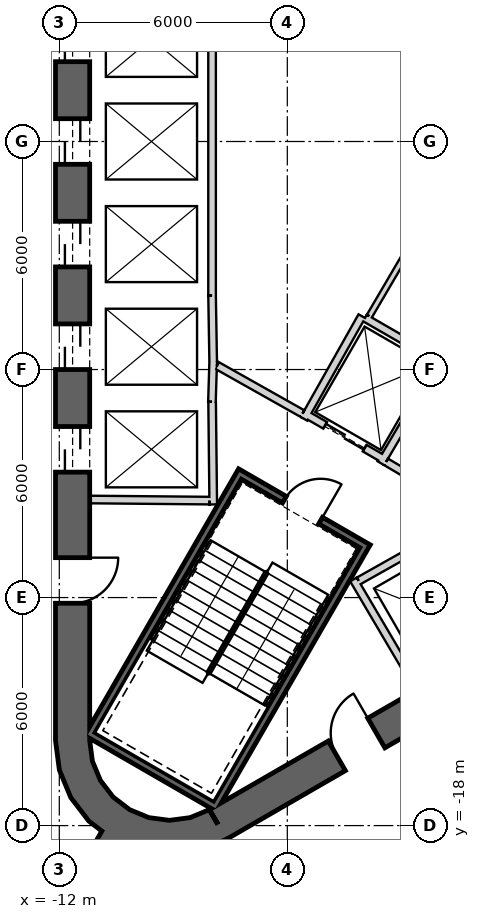
"""IFC4 building model, lengths in metres.
Left out: names, types, materials, properties, quantities, classifications, styles, units other than length and angle.
Written with IfcOpenShell. Run it as: python <this file> out.ifc"""

import sys

from ifc_helpers import new_model, si_unit, direction, frame, frame_2d, origin, place, context, subcontext, project, spatial, polyline, rectangle, outline, extrude, element, fill, save


model = new_model("IFC4")
c1 = context("Model", 3, precision=1e-05, world=origin(), true_north=direction((0.0, 1.0)))
c2 = subcontext(c1, "Body", "Model", "MODEL_VIEW")
j1 = project(units=[si_unit("LENGTHUNIT", "METRE"), si_unit("PLANEANGLEUNIT", "RADIAN")], contexts=[c1])
p1 = place(None, origin())
s1 = spatial("IfcSite", under=j1, at=p1, CompositionType="ELEMENT")
p2 = place(p1, origin())
s2 = spatial("IfcBuilding", under=s1, at=p2, CompositionType="ELEMENT")
p3 = place(p2, frame((0.0, 0.0, 205.2)))
s3 = spatial("IfcBuildingStorey", under=s2, at=p3, CompositionType="ELEMENT", Elevation=205.2)
p4 = place(p3, frame((19.475, 2.208, 0.0), z_axis=(0.0, 0.0, 1.0), x_axis=(-0.866028369851, 0.499994862586, 0.0)))
e1 = element("IfcWall", 1, at=p4, inside=s3, PredefinedType="SHEAR", context=c2, shape_type="SweptSolid", body=[
    extrude(rectangle(XDim=31.523, YDim=0.9, at=frame_2d((15.762, 0.0))), origin(), (0.0, 0.0, 1.0), 4.0),
])
p5 = place(p4, frame((7.062, 0.0, 0.0)))
e2 = element("IfcOpeningElement", 2, at=p5, cuts=e1, PredefinedType="OPENING", context=c2, shape_type="SweptSolid", body=[
    extrude(rectangle(XDim=1.2, YDim=2.4, at=frame_2d((0.6, 1.2))), frame((0.0, 0.46, 0.0), z_axis=(0.0, -1.0, 0.0), x_axis=(1.0, 0.0, 0.0)), (0.0, 0.0, 1.0), 0.92),
])
p6 = place(p4, frame((3.612, 0.0, 0.0)))
e3 = element("IfcOpeningElement", 3, at=p6, cuts=e1, PredefinedType="OPENING", context=c2, shape_type="SweptSolid", body=[
    extrude(rectangle(XDim=1.2, YDim=2.4, at=frame_2d((0.6, 1.2))), frame((0.0, 0.46, 0.0), z_axis=(0.0, -1.0, 0.0), x_axis=(1.0, 0.0, 0.0)), (0.0, 0.0, 1.0), 0.92),
])
p7 = place(p4, frame((26.712, 0.0, 0.0)))
e4 = element("IfcOpeningElement", 4, at=p7, cuts=e1, PredefinedType="OPENING", context=c2, shape_type="SweptSolid", body=[
    extrude(rectangle(XDim=1.2, YDim=2.4, at=frame_2d((0.6, 1.2))), frame((0.0, 0.46, 0.0), z_axis=(0.0, -1.0, 0.0), x_axis=(1.0, 0.0, 0.0)), (0.0, 0.0, 1.0), 0.92),
])
p8 = place(p3, frame((-11.65, 15.762, 0.0), z_axis=(0.0, 0.0, 1.0), x_axis=(0.0, -1.0, 0.0)))
e5 = element("IfcWall", 5, at=p8, inside=s3, PredefinedType="SHEAR", context=c2, shape_type="SweptSolid", body=[
    extrude(rectangle(XDim=31.523, YDim=0.9, at=frame_2d((15.762, 0.0))), origin(), (0.0, 0.0, 1.0), 4.0),
])
p9 = place(p8, frame((7.062, 0.0, 0.0)))
e6 = element("IfcOpeningElement", 6, at=p9, cuts=e5, PredefinedType="OPENING", context=c2, shape_type="SweptSolid", body=[
    extrude(rectangle(XDim=1.2, YDim=2.4, at=frame_2d((0.6, 1.2))), frame((0.0, 0.46, 0.0), z_axis=(0.0, -1.0, 0.0), x_axis=(1.0, 0.0, 0.0)), (0.0, 0.0, 1.0), 0.92),
])
p10 = place(p8, frame((9.762, 0.0, 0.0)))
e7 = element("IfcOpeningElement", 7, at=p10, cuts=e5, PredefinedType="OPENING", context=c2, shape_type="SweptSolid", body=[
    extrude(rectangle(XDim=1.2, YDim=2.4, at=frame_2d((0.6, 1.2))), frame((0.0, 0.46, 0.0), z_axis=(0.0, -1.0, 0.0), x_axis=(1.0, 0.0, 0.0)), (0.0, 0.0, 1.0), 0.92),
])
p11 = place(p8, frame((12.462, 0.0, 0.0)))
e8 = element("IfcOpeningElement", 8, at=p11, cuts=e5, PredefinedType="OPENING", context=c2, shape_type="SweptSolid", body=[
    extrude(rectangle(XDim=1.2, YDim=2.4, at=frame_2d((0.6, 1.2))), frame((0.0, 0.46, 0.0), z_axis=(0.0, -1.0, 0.0), x_axis=(1.0, 0.0, 0.0)), (0.0, 0.0, 1.0), 0.92),
])
p12 = place(p8, frame((15.162, 0.0, 0.0)))
e9 = element("IfcOpeningElement", 9, at=p12, cuts=e5, PredefinedType="OPENING", context=c2, shape_type="SweptSolid", body=[
    extrude(rectangle(XDim=1.2, YDim=2.4, at=frame_2d((0.6, 1.2))), frame((0.0, 0.46, 0.0), z_axis=(0.0, -1.0, 0.0), x_axis=(1.0, 0.0, 0.0)), (0.0, 0.0, 1.0), 0.92),
])
p13 = place(p8, frame((17.862, 0.0, 0.0)))
e10 = element("IfcOpeningElement", 10, at=p13, cuts=e5, PredefinedType="OPENING", context=c2, shape_type="SweptSolid", body=[
    extrude(rectangle(XDim=1.2, YDim=2.4, at=frame_2d((0.6, 1.2))), frame((0.0, 0.46, 0.0), z_axis=(0.0, -1.0, 0.0), x_axis=(1.0, 0.0, 0.0)), (0.0, 0.0, 1.0), 0.92),
])
p14 = place(p8, frame((20.562, 0.0, 0.0)))
e11 = element("IfcOpeningElement", 11, at=p14, cuts=e5, PredefinedType="OPENING", context=c2, shape_type="SweptSolid", body=[
    extrude(rectangle(XDim=1.2, YDim=2.4, at=frame_2d((0.6, 1.2))), frame((0.0, 0.46, 0.0), z_axis=(0.0, -1.0, 0.0), x_axis=(1.0, 0.0, 0.0)), (0.0, 0.0, 1.0), 0.92),
])
p15 = place(p8, frame((23.262, 0.0, 0.0)))
e12 = element("IfcOpeningElement", 12, at=p15, cuts=e5, PredefinedType="OPENING", context=c2, shape_type="SweptSolid", body=[
    extrude(rectangle(XDim=1.2, YDim=2.4, at=frame_2d((0.6, 1.2))), frame((0.0, 0.46, 0.0), z_axis=(0.0, -1.0, 0.0), x_axis=(1.0, 0.0, 0.0)), (0.0, 0.0, 1.0), 0.92),
])
p16 = place(p8, frame((3.612, 0.0, 0.0)))
e13 = element("IfcOpeningElement", 13, at=p16, cuts=e5, PredefinedType="OPENING", context=c2, shape_type="SweptSolid", body=[
    extrude(rectangle(XDim=1.2, YDim=2.4, at=frame_2d((0.6, 1.2))), frame((0.0, 0.46, 0.0), z_axis=(0.0, -1.0, 0.0), x_axis=(1.0, 0.0, 0.0)), (0.0, 0.0, 1.0), 0.92),
])
p17 = place(p8, frame((26.712, 0.0, 0.0)))
e14 = element("IfcOpeningElement", 14, at=p17, cuts=e5, PredefinedType="OPENING", context=c2, shape_type="SweptSolid", body=[
    extrude(rectangle(XDim=1.2, YDim=2.4, at=frame_2d((0.6, 1.2))), frame((0.0, 0.46, 0.0), z_axis=(0.0, -1.0, 0.0), x_axis=(1.0, 0.0, 0.0)), (0.0, 0.0, 1.0), 0.92),
])
p18 = place(p3, frame((-7.825, -17.97, 0.0), z_axis=(0.0, 0.0, 1.0), x_axis=(0.866028369851, 0.499994862586, 0.0)))
e15 = element("IfcWall", 15, at=p18, inside=s3, PredefinedType="SHEAR", context=c2, shape_type="SweptSolid", body=[
    extrude(rectangle(XDim=31.523, YDim=0.9, at=frame_2d((15.762, 0.0))), origin(), (0.0, 0.0, 1.0), 4.0),
])
p19 = place(p18, frame((7.062, 0.0, 0.0)))
e16 = element("IfcOpeningElement", 16, at=p19, cuts=e15, PredefinedType="OPENING", context=c2, shape_type="SweptSolid", body=[
    extrude(rectangle(XDim=1.2, YDim=2.4, at=frame_2d((0.6, 1.2))), frame((0.0, 0.46, 0.0), z_axis=(0.0, -1.0, 0.0), x_axis=(1.0, 0.0, 0.0)), (0.0, 0.0, 1.0), 0.92),
])
p20 = place(p18, frame((9.762, 0.0, 0.0)))
e17 = element("IfcOpeningElement", 17, at=p20, cuts=e15, PredefinedType="OPENING", context=c2, shape_type="SweptSolid", body=[
    extrude(rectangle(XDim=1.2, YDim=2.4, at=frame_2d((0.6, 1.2))), frame((0.0, 0.46, 0.0), z_axis=(0.0, -1.0, 0.0), x_axis=(1.0, 0.0, 0.0)), (0.0, 0.0, 1.0), 0.92),
])
p21 = place(p18, frame((12.462, 0.0, 0.0)))
e18 = element("IfcOpeningElement", 18, at=p21, cuts=e15, PredefinedType="OPENING", context=c2, shape_type="SweptSolid", body=[
    extrude(rectangle(XDim=1.2, YDim=2.4, at=frame_2d((0.6, 1.2))), frame((0.0, 0.46, 0.0), z_axis=(0.0, -1.0, 0.0), x_axis=(1.0, 0.0, 0.0)), (0.0, 0.0, 1.0), 0.92),
])
p22 = place(p18, frame((15.162, 0.0, 0.0)))
e19 = element("IfcOpeningElement", 19, at=p22, cuts=e15, PredefinedType="OPENING", context=c2, shape_type="SweptSolid", body=[
    extrude(rectangle(XDim=1.2, YDim=2.4, at=frame_2d((0.6, 1.2))), frame((0.0, 0.46, 0.0), z_axis=(0.0, -1.0, 0.0), x_axis=(1.0, 0.0, 0.0)), (0.0, 0.0, 1.0), 0.92),
])
p23 = place(p18, frame((17.862, 0.0, 0.0)))
e20 = element("IfcOpeningElement", 20, at=p23, cuts=e15, PredefinedType="OPENING", context=c2, shape_type="SweptSolid", body=[
    extrude(rectangle(XDim=1.2, YDim=2.4, at=frame_2d((0.6, 1.2))), frame((0.0, 0.46, 0.0), z_axis=(0.0, -1.0, 0.0), x_axis=(1.0, 0.0, 0.0)), (0.0, 0.0, 1.0), 0.92),
])
p24 = place(p18, frame((20.562, 0.0, 0.0)))
e21 = element("IfcOpeningElement", 21, at=p24, cuts=e15, PredefinedType="OPENING", context=c2, shape_type="SweptSolid", body=[
    extrude(rectangle(XDim=1.2, YDim=2.4, at=frame_2d((0.6, 1.2))), frame((0.0, 0.46, 0.0), z_axis=(0.0, -1.0, 0.0), x_axis=(1.0, 0.0, 0.0)), (0.0, 0.0, 1.0), 0.92),
])
p25 = place(p18, frame((26.712, 0.0, 0.0)))
e22 = element("IfcOpeningElement", 22, at=p25, cuts=e15, PredefinedType="OPENING", context=c2, shape_type="SweptSolid", body=[
    extrude(rectangle(XDim=1.2, YDim=2.4, at=frame_2d((0.6, 1.2))), frame((0.0, 0.46, 0.0), z_axis=(0.0, -1.0, 0.0), x_axis=(1.0, 0.0, 0.0)), (0.0, 0.0, 1.0), 0.92),
])
p26 = place(p18, frame((3.612, 0.0, 0.0)))
e23 = element("IfcOpeningElement", 23, at=p26, cuts=e15, PredefinedType="OPENING", context=c2, shape_type="SweptSolid", body=[
    extrude(rectangle(XDim=1.2, YDim=2.4, at=frame_2d((0.6, 1.2))), frame((0.0, 0.46, 0.0), z_axis=(0.0, -1.0, 0.0), x_axis=(1.0, 0.0, 0.0)), (0.0, 0.0, 1.0), 0.92),
])
p27 = place(p3, origin())
e24 = element("IfcWall", 24, at=p27, inside=s3, PredefinedType="SHEAR", context=c2, shape_type="SweptSolid", body=[
    extrude(outline(polyline([(-12.1, -15.762), (-11.998, -16.538), (-11.698, -17.262), (-11.221, -17.883), (-10.6, -18.36), (-9.876, -18.659), (-9.1, -18.762), (-8.323, -18.659), (-7.6, -18.36), (-8.05, -17.58), (-8.556, -17.79), (-9.1, -17.862), (-9.644, -17.79), (-10.15, -17.58), (-10.585, -17.247), (-10.919, -16.812), (-11.128, -16.305), (-11.2, -15.762), (-12.1, -15.762)])), origin(), (0.0, 0.0, 1.0), 4.0),
])
p28 = place(p3, frame((-10.575, -18.316, 0.0), z_axis=(0.0, 0.0, 1.0), x_axis=(-0.499999598486, -0.866025635599, 0.0)))
e25 = element("IfcWall", 25, at=p28, inside=s3, PredefinedType="SHEAR", context=c2, shape_type="SweptSolid", body=[
    extrude(rectangle(XDim=11.794, YDim=0.7, at=frame_2d((5.897, 0.0))), origin(), (0.0, 0.0, 1.0), 4.0),
])
p29 = place(p3, frame((-7.98, 4.05, 0.0), z_axis=(0.0, 0.0, 1.0), x_axis=(0.0, -1.0, 0.0)))
e26 = element("IfcWall", 26, at=p29, inside=s3, PredefinedType="PLUMBINGWALL", context=c2, shape_type="SweptSolid", body=[
    extrude(rectangle(XDim=8.1, YDim=0.2, at=frame_2d((4.05, 0.0))), origin(), (0.0, 0.0, 1.0), 3.7),
])
p30 = place(p3, frame((-7.95, -5.772, 0.0), z_axis=(0.0, 0.0, 1.0), x_axis=(-0.030803413295, -0.999525462272, 0.0)))
e27 = element("IfcWall", 27, at=p30, inside=s3, PredefinedType="PLUMBINGWALL", context=c2, shape_type="SweptSolid", body=[
    extrude(rectangle(XDim=1.078, YDim=0.2, at=frame_2d((0.539, 0.0))), origin(), (0.0, 0.0, 1.0), 3.7),
])
p31 = place(p3, frame((-7.98, -4.05, 0.0), z_axis=(0.0, 0.0, 1.0), x_axis=(0.016809909365, -0.999858703491, 0.0)))
e28 = element("IfcWall", 28, at=p31, inside=s3, PredefinedType="PLUMBINGWALL", context=c2, shape_type="SweptSolid", body=[
    extrude(rectangle(XDim=1.844, YDim=0.2, at=frame_2d((0.922, 0.0))), origin(), (0.0, 0.0, 1.0), 3.7),
])
p32 = place(p3, frame((-7.979, -6.85, 0.0), z_axis=(0.0, 0.0, 1.0), x_axis=(0.011121475088, -0.999938154483, 0.0)))
e29 = element("IfcWall", 29, at=p32, inside=s3, PredefinedType="PLUMBINGWALL", context=c2, shape_type="SweptSolid", body=[
    extrude(rectangle(XDim=2.7, YDim=0.2, at=frame_2d((1.35, 0.0))), origin(), (0.0, 0.0, 1.0), 3.7),
])
p33 = place(p3, frame((-8.05, -9.449, 0.0), z_axis=(0.0, 0.0, 1.0), x_axis=(-0.999957467379, 0.009222983926, 0.0)))
e30 = element("IfcWall", 30, at=p33, inside=s3, PredefinedType="PLUMBINGWALL", context=c2, shape_type="SweptSolid", body=[
    extrude(rectangle(XDim=3.15, YDim=0.2, at=frame_2d((1.575, 0.0))), origin(), (0.0, 0.0, 1.0), 3.7),
])
p34 = place(p3, frame((-2.558, -14.409, 0.0), z_axis=(0.0, 0.0, 1.0), x_axis=(-0.507997497166, 0.861358544901, 0.0)))
e31 = element("IfcWall", 31, at=p34, inside=s3, PredefinedType="PLUMBINGWALL", context=c2, shape_type="SweptSolid", body=[
    extrude(rectangle(XDim=3.35, YDim=0.2, at=frame_2d((1.675, 0.0))), origin(), (0.0, 0.0, 1.0), 3.7),
])
p35 = place(p3, frame((-1.769, -10.237, 0.0), z_axis=(0.0, 0.0, 1.0), x_axis=(-0.871534483978, -0.490334215854, 0.0)))
e32 = element("IfcWall", 32, at=p35, inside=s3, PredefinedType="PLUMBINGWALL", context=c2, shape_type="SweptSolid", body=[
    extrude(rectangle(XDim=2.7, YDim=0.2, at=frame_2d((1.35, 0.0))), origin(), (0.0, 0.0, 1.0), 3.7),
])
p36 = place(p3, frame((-3.905, -10.563, -0.3), z_axis=(0.0, 0.0, 1.0), x_axis=(-0.500012932018, -0.866017937352, 0.0)))
e33 = element("IfcWall", 33, at=p36, inside=s3, PredefinedType="SHEAR", context=c2, shape_type="SweptSolid", body=[
    extrude(rectangle(XDim=8.1, YDim=0.2, at=frame_2d((4.05, 0.0))), origin(), (0.0, 0.0, 1.0), 4.0),
])
p37 = place(p3, frame((-11.282, -15.541, -0.3), z_axis=(0.0, 0.0, 1.0), x_axis=(0.866000483506, -0.500043160704, 0.0)))
e34 = element("IfcWall", 34, at=p37, inside=s3, PredefinedType="SHEAR", context=c2, shape_type="SweptSolid", body=[
    extrude(rectangle(XDim=3.8, YDim=0.2, at=frame_2d((1.9, 0.0))), origin(), (0.0, 0.0, 1.0), 4.0),
])
p38 = place(p3, frame((-7.196, -8.663, -0.3), z_axis=(0.0, 0.0, 1.0), x_axis=(-0.499997992926, -0.866026562566, 0.0)))
e35 = element("IfcWall", 35, at=p38, inside=s3, PredefinedType="SHEAR", context=c2, shape_type="SweptSolid", body=[
    extrude(rectangle(XDim=7.9, YDim=0.2, at=frame_2d((3.95, 0.0))), origin(), (0.0, 0.0, 1.0), 4.0),
])
p39 = place(p3, frame((-4.041, -10.599, -0.3), z_axis=(0.0, 0.0, 1.0), x_axis=(-0.866047807691, 0.499961193289, 0.0)))
e36 = element("IfcWall", 36, at=p39, inside=s3, PredefinedType="SHEAR", context=c2, shape_type="SweptSolid", body=[
    extrude(rectangle(XDim=3.6, YDim=0.2, at=frame_2d((1.8, 0.0))), origin(), (0.0, 0.0, 1.0), 4.0),
])
p40 = place(p39, frame((1.25, 0.0, 0.3)))
e37 = element("IfcOpeningElement", 37, at=p40, cuts=e36, PredefinedType="OPENING", context=c2, shape_type="SweptSolid", body=[
    extrude(rectangle(XDim=1.1, YDim=2.1, at=frame_2d((0.55, 1.05))), frame((0.0, 0.11, 0.0), z_axis=(0.0, -1.0, 0.0), x_axis=(1.0, 0.0, 0.0)), (0.0, 0.0, 1.0), 0.22),
])
p41 = place(p3, frame((-3.446, -8.368, 0.0), z_axis=(0.0, 0.0, 1.0), x_axis=(-0.866024647952, 0.500001309137, 0.0)))
e38 = element("IfcWall", 38, at=p41, inside=s3, PredefinedType="PLUMBINGWALL", context=c2, shape_type="SweptSolid", body=[
    extrude(rectangle(XDim=2.4, YDim=0.2, at=frame_2d((1.2, 0.0))), origin(), (0.0, 0.0, 1.0), 3.7),
])
p42 = place(p41, frame((0.6, 0.0, 0.0)))
e39 = element("IfcOpeningElement", 39, at=p42, cuts=e38, PredefinedType="OPENING", context=c2, shape_type="SweptSolid", body=[
    extrude(rectangle(XDim=1.2, YDim=2.4, at=frame_2d((0.6, 1.2))), frame((0.0, 0.11, 0.0), z_axis=(0.0, -1.0, 0.0), x_axis=(1.0, 0.0, 0.0)), (0.0, 0.0, 1.0), 0.22),
])
p43 = place(p3, frame((-5.562, -7.296, 0.0), z_axis=(0.0, 0.0, 1.0), x_axis=(0.491322718731, 0.870977603649, 0.0)))
e40 = element("IfcWall", 40, at=p43, inside=s3, PredefinedType="PLUMBINGWALL", context=c2, shape_type="SweptSolid", body=[
    extrude(rectangle(XDim=3.1, YDim=0.2, at=frame_2d((1.55, 0.0))), origin(), (0.0, 0.0, 1.0), 3.7),
])
p44 = place(p3, frame((-3.957, -4.644, 0.0), z_axis=(0.0, 0.0, 1.0), x_axis=(0.865991127953, -0.500059362782, 0.0)))
e41 = element("IfcWall", 41, at=p44, inside=s3, PredefinedType="PLUMBINGWALL", context=c2, shape_type="SweptSolid", body=[
    extrude(rectangle(XDim=2.405, YDim=0.2, at=frame_2d((1.202, 0.0))), origin(), (0.0, 0.0, 1.0), 3.7),
])
p45 = place(p3, frame((-2.012, -5.882, 0.0), z_axis=(0.0, 0.0, 1.0), x_axis=(-0.508619639323, -0.860991325447, 0.0)))
e42 = element("IfcWall", 42, at=p45, inside=s3, PredefinedType="PLUMBINGWALL", context=c2, shape_type="SweptSolid", body=[
    extrude(rectangle(XDim=3.0, YDim=0.2, at=frame_2d((1.5, 0.0))), origin(), (0.0, 0.0, 1.0), 3.7),
])
p46 = place(p3, frame((-7.849, -5.894, 0.0), z_axis=(0.0, 0.0, 1.0), x_axis=(0.871340486379, -0.490678873396, 0.0)))
e43 = element("IfcWall", 43, at=p46, inside=s3, PredefinedType="PARTITIONING", context=c2, shape_type="SweptSolid", body=[
    extrude(rectangle(XDim=2.581, YDim=0.2, at=frame_2d((1.291, 0.0))), origin(), (0.0, 0.0, 1.0), 3.7),
])
p47 = place(p3, frame((-3.401, -8.43, 0.0), z_axis=(0.0, 0.0, 1.0), x_axis=(0.860598681535, -0.509283721849, 0.0)))
e44 = element("IfcWall", 44, at=p47, inside=s3, PredefinedType="PARTITIONING", context=c2, shape_type="SweptSolid", body=[
    extrude(rectangle(XDim=2.581, YDim=0.2, at=frame_2d((1.291, 0.0))), origin(), (0.0, 0.0, 1.0), 3.7),
])
p48 = place(p47, frame((0.791, 0.0, 0.0)))
e45 = element("IfcOpeningElement", 45, at=p48, cuts=e44, PredefinedType="OPENING", context=c2, shape_type="SweptSolid", body=[
    extrude(rectangle(XDim=1.0, YDim=2.1, at=frame_2d((0.5, 1.05))), frame((0.0, 0.11, 0.0), z_axis=(0.0, -1.0, 0.0), x_axis=(1.0, 0.0, 0.0)), (0.0, 0.0, 1.0), 0.22),
])
p49 = place(p3, frame((-1.624, 0.815, 0.0), z_axis=(0.0, 0.0, 1.0), x_axis=(-0.505868173579, 0.862610799237, 0.0)))
e46 = element("IfcWall", 46, at=p49, inside=s3, PredefinedType="PLUMBINGWALL", context=c2, shape_type="SweptSolid", body=[
    extrude(rectangle(XDim=4.383, YDim=0.15, at=frame_2d((2.191, 0.0))), origin(), (0.0, 0.0, 1.0), 3.7),
])
p50 = place(p49, frame((1.855, 0.0, 0.0)))
e47 = element("IfcOpeningElement", 47, at=p50, cuts=e46, PredefinedType="OPENING", context=c2, shape_type="SweptSolid", body=[
    extrude(rectangle(XDim=0.8, YDim=2.1, at=frame_2d((0.4, 1.05))), frame((0.0, 0.085, 0.0), z_axis=(0.0, -1.0, 0.0), x_axis=(1.0, 0.0, 0.0)), (0.0, 0.0, 1.0), 0.17),
])
p51 = place(p3, frame((-3.841, -4.595, 0.0), z_axis=(0.0, 0.0, 1.0), x_axis=(0.505857207696, 0.862617229959, 0.0)))
e48 = element("IfcWall", 48, at=p51, inside=s3, PredefinedType="PLUMBINGWALL", context=c2, shape_type="SweptSolid", body=[
    extrude(rectangle(XDim=4.231, YDim=0.15, at=frame_2d((2.116, 0.0))), origin(), (0.0, 0.0, 1.0), 3.7),
])
p52 = place(p3, frame((-6.019, -23.22, 0.0), z_axis=(0.0, 0.0, 1.0), x_axis=(0.866022928472, 0.500004287342, 0.0)))
e49 = element("IfcWall", 49, at=p52, inside=s3, PredefinedType="PARTITIONING", context=c2, shape_type="SweptSolid", body=[
    extrude(rectangle(XDim=12.473, YDim=0.2, at=frame_2d((6.236, 0.0))), origin(), (0.0, 0.0, 1.0), 2.88),
])
p53 = place(p40, origin())
e50 = element("IfcDoor", 50, at=p53, inside=s3, OperationType="SINGLE_SWING_LEFT", PredefinedType="USERDEFINED", context=c2, shape_type="SweptSolid", body=[
    extrude(rectangle(XDim=1.1, YDim=2.1, at=frame_2d((0.55, 1.05))), frame((0.0, 0.025, 0.0), z_axis=(0.0, -1.0, 0.0), x_axis=(1.0, 0.0, 0.0)), (0.0, 0.0, 1.0), 0.05),
])
fill(e37, e50)
p54 = place(p42, origin())
e51 = element("IfcDoor", 51, at=p54, inside=s3, OperationType="SLIDING_TO_LEFT", PredefinedType="USERDEFINED", context=c2, shape_type="SweptSolid", body=[
    extrude(rectangle(XDim=1.2, YDim=2.4, at=frame_2d((0.6, 1.2))), frame((0.0, 0.025, 0.0), z_axis=(0.0, -1.0, 0.0), x_axis=(1.0, 0.0, 0.0)), (0.0, 0.0, 1.0), 0.05),
])
fill(e39, e51)
p55 = place(p11, origin())
e52 = element("IfcDoor", 52, at=p55, inside=s3, OperationType="SLIDING_TO_LEFT", PredefinedType="USERDEFINED", context=c2, shape_type="SweptSolid", body=[
    extrude(rectangle(XDim=1.2, YDim=2.4, at=frame_2d((0.6, 1.2))), frame((0.0, 0.025, 0.0), z_axis=(0.0, -1.0, 0.0), x_axis=(1.0, 0.0, 0.0)), (0.0, 0.0, 1.0), 0.05),
])
fill(e8, e52)
p56 = place(p12, origin())
e53 = element("IfcDoor", 53, at=p56, inside=s3, OperationType="SLIDING_TO_LEFT", PredefinedType="USERDEFINED", context=c2, shape_type="SweptSolid", body=[
    extrude(rectangle(XDim=1.2, YDim=2.4, at=frame_2d((0.6, 1.2))), frame((0.0, 0.025, 0.0), z_axis=(0.0, -1.0, 0.0), x_axis=(1.0, 0.0, 0.0)), (0.0, 0.0, 1.0), 0.05),
])
fill(e9, e53)
p57 = place(p13, origin())
e54 = element("IfcDoor", 54, at=p57, inside=s3, OperationType="SLIDING_TO_LEFT", PredefinedType="USERDEFINED", context=c2, shape_type="SweptSolid", body=[
    extrude(rectangle(XDim=1.2, YDim=2.4, at=frame_2d((0.6, 1.2))), frame((0.0, 0.025, 0.0), z_axis=(0.0, -1.0, 0.0), x_axis=(1.0, 0.0, 0.0)), (0.0, 0.0, 1.0), 0.05),
])
fill(e10, e54)
p58 = place(p14, origin())
e55 = element("IfcDoor", 55, at=p58, inside=s3, OperationType="SLIDING_TO_LEFT", PredefinedType="USERDEFINED", context=c2, shape_type="SweptSolid", body=[
    extrude(rectangle(XDim=1.2, YDim=2.4, at=frame_2d((0.6, 1.2))), frame((0.0, 0.025, 0.0), z_axis=(0.0, -1.0, 0.0), x_axis=(1.0, 0.0, 0.0)), (0.0, 0.0, 1.0), 0.05),
])
fill(e11, e55)
p59 = place(p15, origin())
e56 = element("IfcDoor", 56, at=p59, inside=s3, OperationType="SLIDING_TO_LEFT", PredefinedType="USERDEFINED", context=c2, shape_type="SweptSolid", body=[
    extrude(rectangle(XDim=1.2, YDim=2.4, at=frame_2d((0.6, 1.2))), frame((0.0, 0.025, 0.0), z_axis=(0.0, -1.0, 0.0), x_axis=(1.0, 0.0, 0.0)), (0.0, 0.0, 1.0), 0.05),
])
fill(e12, e56)
p60 = place(p17, origin())
e57 = element("IfcDoor", 57, at=p60, inside=s3, OperationType="SINGLE_SWING_RIGHT", PredefinedType="USERDEFINED", context=c2, shape_type="SweptSolid", body=[
    extrude(rectangle(XDim=1.2, YDim=2.4, at=frame_2d((0.6, 1.2))), frame((0.0, 0.025, 0.0), z_axis=(0.0, -1.0, 0.0), x_axis=(1.0, 0.0, 0.0)), (0.0, 0.0, 1.0), 0.05),
])
fill(e14, e57)
p61 = place(p26, origin())
e58 = element("IfcDoor", 58, at=p61, inside=s3, OperationType="SINGLE_SWING_LEFT", PredefinedType="USERDEFINED", context=c2, shape_type="SweptSolid", body=[
    extrude(rectangle(XDim=1.2, YDim=2.4, at=frame_2d((0.6, 1.2))), frame((0.0, 0.025, 0.0), z_axis=(0.0, -1.0, 0.0), x_axis=(1.0, 0.0, 0.0)), (0.0, 0.0, 1.0), 0.05),
])
fill(e23, e58)
save(model, sys.argv[1])
